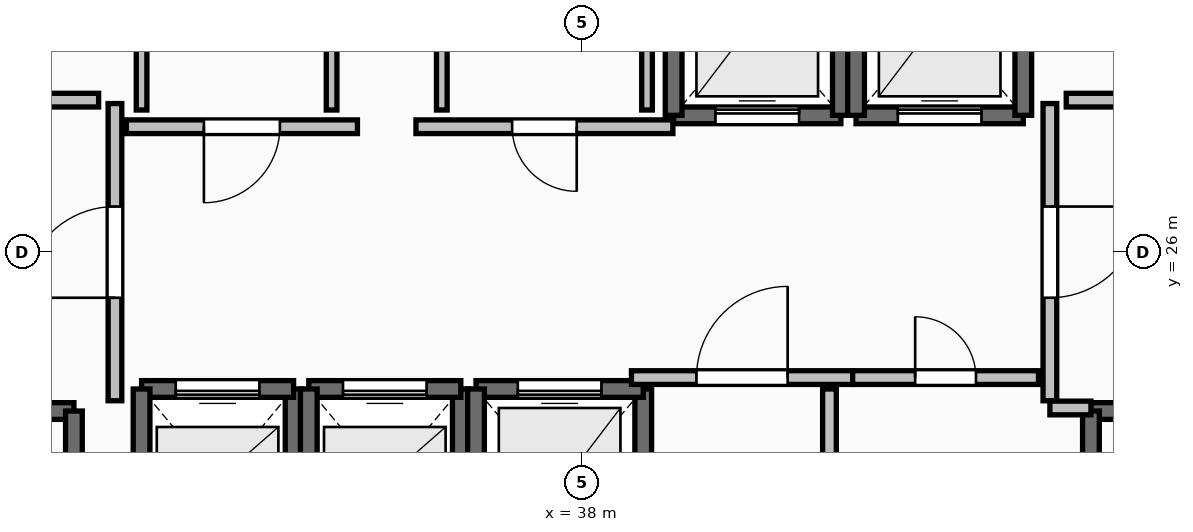
"""IFC4 building model, lengths in metres.
Left out: names, types, materials, properties, quantities, classifications, styles, units other than length and angle.
Written with IfcOpenShell. Run it as: python <this file> out.ifc"""

import sys

from ifc_helpers import new_model, si_unit, direction, frame, frame_2d, origin, place, context, subcontext, project, spatial, rectangle, extrude, element, fill, save


model = new_model("IFC4")
c1 = context("Model", 3, precision=1e-05, world=origin(), true_north=direction((0.0, 1.0)))
c2 = subcontext(c1, "Body", "Model", "MODEL_VIEW")
j1 = project(units=[si_unit("LENGTHUNIT", "METRE"), si_unit("PLANEANGLEUNIT", "RADIAN")], contexts=[c1])
p1 = place(None, origin())
s1 = spatial("IfcSite", under=j1, at=p1, CompositionType="ELEMENT")
p2 = place(p1, origin())
s2 = spatial("IfcBuilding", under=s1, at=p2, CompositionType="ELEMENT")
p3 = place(p2, frame((0.0, 0.0, 174.6)))
s3 = spatial("IfcBuildingStorey", under=s2, at=p3, CompositionType="ELEMENT", Elevation=174.6)
p4 = place(p3, frame((27.94, 23.91, 0.0), z_axis=(0.0, 0.0, 1.0), x_axis=(1.0, 0.0, 0.0)))
e1 = element("IfcWall", 1, at=p4, inside=s3, PredefinedType="SOLIDWALL", context=c2, shape_type="SweptSolid", body=[
    extrude(rectangle(XDim=3.37, YDim=0.22, at=frame_2d((1.685, 0.0))), origin(), (0.0, 0.0, 1.0), 4.24),
])
p5 = place(p4, frame((1.135, 0.0, 0.0)))
e2 = element("IfcOpeningElement", 2, at=p5, cuts=e1, PredefinedType="OPENING", context=c2, shape_type="SweptSolid", body=[
    extrude(rectangle(XDim=1.1, YDim=2.15, at=frame_2d((0.55, 1.075))), frame((0.0, 0.125, 0.0), z_axis=(0.0, -1.0, 0.0), x_axis=(1.0, 0.0, 0.0)), (0.0, 0.0, 1.0), 0.25),
])
p6 = place(p3, frame((31.31, 23.91, 0.0), z_axis=(0.0, 0.0, 1.0), x_axis=(0.0, -1.0, 0.0)))
e3 = element("IfcWall", 3, at=p6, inside=s3, PredefinedType="SOLIDWALL", context=c2, shape_type="SweptSolid", body=[
    extrude(rectangle(XDim=7.42, YDim=0.22, at=frame_2d((3.71, 0.0))), origin(), (0.0, 0.0, 1.0), 4.24),
])
p7 = place(p3, frame((44.69, 23.91, 0.0), z_axis=(0.0, 0.0, 1.0), x_axis=(1.0, 0.0, 0.0)))
e4 = element("IfcWall", 4, at=p7, inside=s3, PredefinedType="SOLIDWALL", context=c2, shape_type="SweptSolid", body=[
    extrude(rectangle(XDim=3.37, YDim=0.22, at=frame_2d((1.685, 0.0))), origin(), (0.0, 0.0, 1.0), 4.24),
])
p8 = place(p7, frame((1.135, 0.0, 0.0)))
e5 = element("IfcOpeningElement", 5, at=p8, cuts=e4, PredefinedType="OPENING", context=c2, shape_type="SweptSolid", body=[
    extrude(rectangle(XDim=1.1, YDim=2.15, at=frame_2d((0.55, 1.075))), frame((0.0, 0.125, 0.0), z_axis=(0.0, -1.0, 0.0), x_axis=(1.0, 0.0, 0.0)), (0.0, 0.0, 1.0), 0.25),
])
p9 = place(p3, frame((44.69, 16.49, 0.0), z_axis=(0.0, 0.0, 1.0), x_axis=(0.0, 1.0, 0.0)))
e6 = element("IfcWall", 6, at=p9, inside=s3, PredefinedType="SOLIDWALL", context=c2, shape_type="SweptSolid", body=[
    extrude(rectangle(XDim=7.42, YDim=0.22, at=frame_2d((3.71, 0.0))), origin(), (0.0, 0.0, 1.0), 4.24),
])
p10 = place(p3, frame((34.2, 21.8, 0.0), z_axis=(0.0, 0.0, 1.0), x_axis=(0.0, 1.0, 0.0)))
e7 = element("IfcWall", 7, at=p10, inside=s3, PredefinedType="SOLIDWALL", context=c2, shape_type="SweptSolid", body=[
    extrude(rectangle(XDim=2.4, YDim=0.22, at=frame_2d((1.2, 0.0))), origin(), (0.0, 0.0, 1.0), 4.24),
])
p11 = place(p3, frame((34.2, 24.2, 0.0), z_axis=(0.0, 0.0, 1.0), x_axis=(-1.0, 0.0, 0.0)))
e8 = element("IfcWall", 8, at=p11, inside=s3, PredefinedType="SOLIDWALL", context=c2, shape_type="SweptSolid", body=[
    extrude(rectangle(XDim=2.0, YDim=0.22, at=frame_2d((1.0, 0.0))), origin(), (0.0, 0.0, 1.0), 4.24),
])
p12 = place(p11, frame((0.45, 0.0, 0.0)))
e9 = element("IfcOpeningElement", 9, at=p12, cuts=e8, PredefinedType="OPENING", context=c2, shape_type="SweptSolid", body=[
    extrude(rectangle(XDim=1.1, YDim=2.2, at=frame_2d((0.55, 1.1))), frame((0.0, 0.125, 0.0), z_axis=(0.0, -1.0, 0.0), x_axis=(1.0, 0.0, 0.0)), (0.0, 0.0, 1.0), 0.25),
])
for number, where, z_axis, x_axis in (
    (10, (32.2, 24.2, 0.0), (0.0, 0.0, 1.0), (0.0, -1.0, 0.0)),
    (11, (36.4, 21.8, 0.0), (0.0, 0.0, 1.0), (0.0, 1.0, 0.0)),
):
    element("IfcWall", number, at=place(p3, frame(where, z_axis=z_axis, x_axis=x_axis)), inside=s3, PredefinedType="SOLIDWALL", context=c2, shape_type="SweptSolid", body=[
        extrude(rectangle(XDim=2.4, YDim=0.22, at=frame_2d((1.2, 0.0))), origin(), (0.0, 0.0, 1.0), 4.24),
    ])
p13 = place(p3, frame((36.4, 24.2, 0.0), z_axis=(0.0, 0.0, 1.0), x_axis=(-1.0, 0.0, 0.0)))
e12 = element("IfcWall", 12, at=p13, inside=s3, PredefinedType="SOLIDWALL", context=c2, shape_type="SweptSolid", body=[
    extrude(rectangle(XDim=2.0, YDim=0.22, at=frame_2d((1.0, 0.0))), origin(), (0.0, 0.0, 1.0), 4.24),
])
p14 = place(p13, frame((0.45, 0.0, 0.0)))
e13 = element("IfcOpeningElement", 13, at=p14, cuts=e12, PredefinedType="OPENING", context=c2, shape_type="SweptSolid", body=[
    extrude(rectangle(XDim=1.1, YDim=2.2, at=frame_2d((0.55, 1.1))), frame((0.0, 0.125, 0.0), z_axis=(0.0, -1.0, 0.0), x_axis=(1.0, 0.0, 0.0)), (0.0, 0.0, 1.0), 0.25),
])
p15 = place(p3, frame((34.4, 24.2, 0.0), z_axis=(0.0, 0.0, 1.0), x_axis=(0.0, -1.0, 0.0)))
e14 = element("IfcWall", 14, at=p15, inside=s3, PredefinedType="SOLIDWALL", context=c2, shape_type="SweptSolid", body=[
    extrude(rectangle(XDim=2.4, YDim=0.22, at=frame_2d((1.2, 0.0))), origin(), (0.0, 0.0, 1.0), 4.24),
])
p16 = place(p3, frame((38.8, 21.6, 0.0), z_axis=(0.0, 0.0, 1.0), x_axis=(0.0, 1.0, 0.0)))
e15 = element("IfcWall", 15, at=p16, inside=s3, PredefinedType="SOLIDWALL", context=c2, shape_type="SweptSolid", body=[
    extrude(rectangle(XDim=2.6, YDim=0.22, at=frame_2d((1.3, 0.0))), origin(), (0.0, 0.0, 1.0), 4.24),
])
p17 = place(p3, frame((38.8, 24.2, 0.0), z_axis=(0.0, 0.0, 1.0), x_axis=(-1.0, 0.0, 0.0)))
e16 = element("IfcWall", 16, at=p17, inside=s3, PredefinedType="SOLIDWALL", context=c2, shape_type="SweptSolid", body=[
    extrude(rectangle(XDim=2.2, YDim=0.22, at=frame_2d((1.1, 0.0))), origin(), (0.0, 0.0, 1.0), 4.24),
])
p18 = place(p17, frame((0.55, 0.0, 0.0)))
e17 = element("IfcOpeningElement", 17, at=p18, cuts=e16, PredefinedType="OPENING", context=c2, shape_type="SweptSolid", body=[
    extrude(rectangle(XDim=1.1, YDim=2.2, at=frame_2d((0.55, 1.1))), frame((0.0, 0.125, 0.0), z_axis=(0.0, -1.0, 0.0), x_axis=(1.0, 0.0, 0.0)), (0.0, 0.0, 1.0), 0.25),
])
p19 = place(p3, frame((36.6, 24.2, 0.0), z_axis=(0.0, 0.0, 1.0), x_axis=(0.0, -1.0, 0.0)))
e18 = element("IfcWall", 18, at=p19, inside=s3, PredefinedType="SOLIDWALL", context=c2, shape_type="SweptSolid", body=[
    extrude(rectangle(XDim=2.6, YDim=0.22, at=frame_2d((1.3, 0.0))), origin(), (0.0, 0.0, 1.0), 4.24),
])
p20 = place(p3, frame((39.2, 27.8, 0.0), z_axis=(0.0, 0.0, 1.0), x_axis=(1.0, 0.0, 0.0)))
e19 = element("IfcWall", 19, at=p20, inside=s3, PredefinedType="SOLIDWALL", context=c2, shape_type="SweptSolid", body=[
    extrude(rectangle(XDim=2.2, YDim=0.22, at=frame_2d((1.1, 0.0))), origin(), (0.0, 0.0, 1.0), 4.24),
])
p21 = place(p20, frame((0.55, 0.0, 0.0)))
e20 = element("IfcOpeningElement", 20, at=p21, cuts=e19, PredefinedType="OPENING", context=c2, shape_type="SweptSolid", body=[
    extrude(rectangle(XDim=1.1, YDim=2.2, at=frame_2d((0.55, 1.1))), frame((0.0, 0.125, 0.0), z_axis=(0.0, -1.0, 0.0), x_axis=(1.0, 0.0, 0.0)), (0.0, 0.0, 1.0), 0.25),
])
for number, where, z_axis, x_axis in (
    (21, (41.4, 27.8, 0.0), (0.0, 0.0, 1.0), (0.0, 1.0, 0.0)),
    (22, (39.2, 30.4, 0.0), (0.0, 0.0, 1.0), (0.0, -1.0, 0.0)),
):
    element("IfcWall", number, at=place(p3, frame(where, z_axis=z_axis, x_axis=x_axis)), inside=s3, PredefinedType="SOLIDWALL", context=c2, shape_type="SweptSolid", body=[
        extrude(rectangle(XDim=2.6, YDim=0.22, at=frame_2d((1.3, 0.0))), origin(), (0.0, 0.0, 1.0), 4.24),
    ])
p22 = place(p3, frame((41.6, 27.8, 0.0), z_axis=(0.0, 0.0, 1.0), x_axis=(1.0, 0.0, 0.0)))
e23 = element("IfcWall", 23, at=p22, inside=s3, PredefinedType="SOLIDWALL", context=c2, shape_type="SweptSolid", body=[
    extrude(rectangle(XDim=2.2, YDim=0.22, at=frame_2d((1.1, 0.0))), origin(), (0.0, 0.0, 1.0), 4.24),
])
p23 = place(p22, frame((0.55, 0.0, 0.0)))
e24 = element("IfcOpeningElement", 24, at=p23, cuts=e23, PredefinedType="OPENING", context=c2, shape_type="SweptSolid", body=[
    extrude(rectangle(XDim=1.1, YDim=2.2, at=frame_2d((0.55, 1.1))), frame((0.0, 0.125, 0.0), z_axis=(0.0, -1.0, 0.0), x_axis=(1.0, 0.0, 0.0)), (0.0, 0.0, 1.0), 0.25),
])
for number, where, z_axis, x_axis in (
    (25, (43.8, 27.8, 0.0), (0.0, 0.0, 1.0), (0.0, 1.0, 0.0)),
    (26, (41.6, 30.4, 0.0), (0.0, 0.0, 1.0), (0.0, -1.0, 0.0)),
):
    element("IfcWall", number, at=place(p3, frame(where, z_axis=z_axis, x_axis=x_axis)), inside=s3, PredefinedType="SOLIDWALL", context=c2, shape_type="SweptSolid", body=[
        extrude(rectangle(XDim=2.6, YDim=0.22, at=frame_2d((1.3, 0.0))), origin(), (0.0, 0.0, 1.0), 4.24),
    ])
p24 = place(p3, frame((31.85, 24.045, 0.0), z_axis=(0.0, 0.0, 1.0), x_axis=(0.0, 1.0, 0.0)))
e27 = element("IfcWall", 27, at=p24, inside=s3, PredefinedType="PARTITIONING", context=c2, shape_type="SweptSolid", body=[
    extrude(rectangle(XDim=3.91, YDim=0.18, at=frame_2d((1.955, 0.0))), origin(), (0.0, 0.0, 1.0), 4.24),
])
p25 = place(p24, frame((1.355, 0.0, 0.0)))
e28 = element("IfcOpeningElement", 28, at=p25, cuts=e27, PredefinedType="OPENING", context=c2, shape_type="SweptSolid", body=[
    extrude(rectangle(XDim=1.2, YDim=2.15, at=frame_2d((0.6, 1.075))), frame((0.0, 0.105, 0.0), z_axis=(0.0, -1.0, 0.0), x_axis=(1.0, 0.0, 0.0)), (0.0, 0.0, 1.0), 0.21),
])
p26 = place(p3, frame((44.15, 27.955, 0.0), z_axis=(0.0, 0.0, 1.0), x_axis=(0.0, -1.0, 0.0)))
e29 = element("IfcWall", 29, at=p26, inside=s3, PredefinedType="PARTITIONING", context=c2, shape_type="SweptSolid", body=[
    extrude(rectangle(XDim=3.91, YDim=0.18, at=frame_2d((1.955, 0.0))), origin(), (0.0, 0.0, 1.0), 4.24),
])
p27 = place(p26, frame((1.355, 0.0, 0.0)))
e30 = element("IfcOpeningElement", 30, at=p27, cuts=e29, PredefinedType="OPENING", context=c2, shape_type="SweptSolid", body=[
    extrude(rectangle(XDim=1.2, YDim=2.15, at=frame_2d((0.6, 1.075))), frame((0.0, 0.105, 0.0), z_axis=(0.0, -1.0, 0.0), x_axis=(1.0, 0.0, 0.0)), (0.0, 0.0, 1.0), 0.21),
])
p28 = place(p3, frame((44.15, 23.95, 0.0), z_axis=(0.0, 0.0, 1.0), x_axis=(1.0, 0.0, 0.0)))
e31 = element("IfcWall", 31, at=p28, inside=s3, PredefinedType="PARTITIONING", context=c2, shape_type="SweptSolid", body=[
    extrude(rectangle(XDim=0.54, YDim=0.18, at=frame_2d((0.27, 0.0))), origin(), (0.0, 0.0, 1.0), 4.24),
])
p29 = place(p3, frame((38.645, 24.35, 0.0), z_axis=(0.0, 0.0, 1.0), x_axis=(1.0, 0.0, 0.0)))
e32 = element("IfcWall", 32, at=p29, inside=s3, PredefinedType="PARTITIONING", context=c2, shape_type="SweptSolid", body=[
    extrude(rectangle(XDim=2.91, YDim=0.18, at=frame_2d((1.455, 0.0))), origin(), (0.0, 0.0, 1.0), 4.24),
])
p30 = place(p29, frame((0.855, 0.0, 0.0)))
e33 = element("IfcOpeningElement", 33, at=p30, cuts=e32, PredefinedType="OPENING", context=c2, shape_type="SweptSolid", body=[
    extrude(rectangle(XDim=1.2, YDim=2.15, at=frame_2d((0.6, 1.075))), frame((0.0, 0.105, 0.0), z_axis=(0.0, -1.0, 0.0), x_axis=(1.0, 0.0, 0.0)), (0.0, 0.0, 1.0), 0.21),
])
p31 = place(p3, frame((41.555, 24.35, 0.0), z_axis=(0.0, 0.0, 1.0), x_axis=(1.0, 0.0, 0.0)))
e34 = element("IfcWall", 34, at=p31, inside=s3, PredefinedType="PARTITIONING", context=c2, shape_type="SweptSolid", body=[
    extrude(rectangle(XDim=2.445, YDim=0.18, at=frame_2d((1.223, 0.0))), origin(), (0.0, 0.0, 1.0), 4.24),
])
p32 = place(p31, frame((0.823, 0.0, 0.0)))
e35 = element("IfcOpeningElement", 35, at=p32, cuts=e34, PredefinedType="OPENING", context=c2, shape_type="SweptSolid", body=[
    extrude(rectangle(XDim=0.8, YDim=2.05, at=frame_2d((0.4, 1.025))), frame((0.0, 0.105, 0.0), z_axis=(0.0, -1.0, 0.0), x_axis=(1.0, 0.0, 0.0)), (0.0, 0.0, 1.0), 0.21),
])
p33 = place(p3, frame((35.04, 27.65, 0.0), z_axis=(0.0, 0.0, 1.0), x_axis=(-1.0, 0.0, 0.0)))
e36 = element("IfcWall", 36, at=p33, inside=s3, PredefinedType="PARTITIONING", context=c2, shape_type="SweptSolid", body=[
    extrude(rectangle(XDim=3.04, YDim=0.18, at=frame_2d((1.52, 0.0))), origin(), (0.0, 0.0, 1.0), 4.24),
])
p34 = place(p33, frame((1.02, 0.0, 0.0)))
e37 = element("IfcOpeningElement", 37, at=p34, cuts=e36, PredefinedType="OPENING", context=c2, shape_type="SweptSolid", body=[
    extrude(rectangle(XDim=1.0, YDim=2.15, at=frame_2d((0.5, 1.075))), frame((0.0, 0.105, 0.0), z_axis=(0.0, -1.0, 0.0), x_axis=(1.0, 0.0, 0.0)), (0.0, 0.0, 1.0), 0.21),
])
p35 = place(p3, frame((39.19, 27.65, 0.0), z_axis=(0.0, 0.0, 1.0), x_axis=(-1.0, 0.0, 0.0)))
e38 = element("IfcWall", 38, at=p35, inside=s3, PredefinedType="PARTITIONING", context=c2, shape_type="SweptSolid", body=[
    extrude(rectangle(XDim=3.38, YDim=0.18, at=frame_2d((1.69, 0.0))), origin(), (0.0, 0.0, 1.0), 4.24),
])
p36 = place(p35, frame((1.265, 0.0, 0.0)))
e39 = element("IfcOpeningElement", 39, at=p36, cuts=e38, PredefinedType="OPENING", context=c2, shape_type="SweptSolid", body=[
    extrude(rectangle(XDim=0.85, YDim=2.1, at=frame_2d((0.425, 1.05))), frame((0.0, 0.105, 0.0), z_axis=(0.0, -1.0, 0.0), x_axis=(1.0, 0.0, 0.0)), (0.0, 0.0, 1.0), 0.21),
])
p37 = place(p3, frame((41.25, 16.32, 0.0), z_axis=(0.0, 0.0, 1.0), x_axis=(0.0, 1.0, 0.0)))
e40 = element("IfcWall", 40, at=p37, inside=s3, PredefinedType="PARTITIONING", context=c2, shape_type="SweptSolid", body=[
    extrude(rectangle(XDim=7.88, YDim=0.18, at=frame_2d((3.94, 0.0))), origin(), (0.0, 0.0, 1.0), 4.24),
])
p38 = place(p37, frame((3.54, 0.0, 0.0)))
e41 = element("IfcOpeningElement", 41, at=p38, cuts=e40, PredefinedType="OPENING", context=c2, shape_type="SweptSolid", body=[
    extrude(rectangle(XDim=0.8, YDim=2.05, at=frame_2d((0.4, 1.025))), frame((0.0, 0.105, 0.0), z_axis=(0.0, -1.0, 0.0), x_axis=(1.0, 0.0, 0.0)), (0.0, 0.0, 1.0), 0.21),
])
for number, where, z_axis, x_axis in (
    (42, (31.635, 28.0, 0.0), (0.0, 0.0, 1.0), (-1.0, 0.0, 0.0)),
    (43, (45.28, 28.0, 0.0), (0.0, 0.0, 1.0), (-1.0, 0.0, 0.0)),
):
    element("IfcWall", number, at=place(p3, frame(where, z_axis=z_axis, x_axis=x_axis)), inside=s3, PredefinedType="PARTITIONING", context=c2, shape_type="SweptSolid", body=[
        extrude(rectangle(XDim=0.915, YDim=0.18, at=frame_2d((0.458, 0.0))), origin(), (0.0, 0.0, 1.0), 4.24),
    ])
for number, where, z_axis, x_axis in (
    (44, (32.2, 30.26, 0.0), (0.0, 0.0, 1.0), (0.0, -1.0, 0.0)),
    (45, (34.7, 27.87, 0.0), (0.0, 0.0, 1.0), (0.0, 1.0, 0.0)),
):
    element("IfcWall", number, at=place(p3, frame(where, z_axis=z_axis, x_axis=x_axis)), inside=s3, PredefinedType="PARTITIONING", context=c2, shape_type="SweptSolid", body=[
        extrude(rectangle(XDim=2.39, YDim=0.14, at=frame_2d((1.195, 0.0))), origin(), (0.0, 0.0, 1.0), 4.24),
    ])
p39 = place(p3, frame((36.15, 30.03, 0.0), z_axis=(0.0, 0.0, 1.0), x_axis=(0.0, -1.0, 0.0)))
e46 = element("IfcWall", 46, at=p39, inside=s3, PredefinedType="PARTITIONING", context=c2, shape_type="SweptSolid", body=[
    extrude(rectangle(XDim=2.16, YDim=0.14, at=frame_2d((1.08, 0.0))), origin(), (0.0, 0.0, 1.0), 4.24),
])
p40 = place(p3, frame((38.85, 27.87, 0.0), z_axis=(0.0, 0.0, 1.0), x_axis=(0.0, 1.0, 0.0)))
e47 = element("IfcWall", 47, at=p40, inside=s3, PredefinedType="PARTITIONING", context=c2, shape_type="SweptSolid", body=[
    extrude(rectangle(XDim=2.39, YDim=0.14, at=frame_2d((1.195, 0.0))), origin(), (0.0, 0.0, 1.0), 4.24),
])
p41 = place(p12, origin())
e48 = element("IfcDoor", 48, at=p41, inside=s3, OperationType="SLIDING_TO_LEFT", PredefinedType="DOOR", context=c2, shape_type="SweptSolid", body=[
    extrude(rectangle(XDim=1.1, YDim=2.2, at=frame_2d((0.55, 1.1))), frame((0.0, 0.025, 0.0), z_axis=(0.0, -1.0, 0.0), x_axis=(1.0, 0.0, 0.0)), (0.0, 0.0, 1.0), 0.05),
])
fill(e9, e48)
p42 = place(p14, origin())
e49 = element("IfcDoor", 49, at=p42, inside=s3, OperationType="SLIDING_TO_LEFT", PredefinedType="DOOR", context=c2, shape_type="SweptSolid", body=[
    extrude(rectangle(XDim=1.1, YDim=2.2, at=frame_2d((0.55, 1.1))), frame((0.0, 0.025, 0.0), z_axis=(0.0, -1.0, 0.0), x_axis=(1.0, 0.0, 0.0)), (0.0, 0.0, 1.0), 0.05),
])
fill(e13, e49)
p43 = place(p18, origin())
e50 = element("IfcDoor", 50, at=p43, inside=s3, OperationType="SLIDING_TO_LEFT", PredefinedType="DOOR", context=c2, shape_type="SweptSolid", body=[
    extrude(rectangle(XDim=1.1, YDim=2.2, at=frame_2d((0.55, 1.1))), frame((0.0, 0.025, 0.0), z_axis=(0.0, -1.0, 0.0), x_axis=(1.0, 0.0, 0.0)), (0.0, 0.0, 1.0), 0.05),
])
fill(e17, e50)
p44 = place(p21, origin())
e51 = element("IfcDoor", 51, at=p44, inside=s3, OperationType="SLIDING_TO_LEFT", PredefinedType="DOOR", context=c2, shape_type="SweptSolid", body=[
    extrude(rectangle(XDim=1.1, YDim=2.2, at=frame_2d((0.55, 1.1))), frame((0.0, 0.025, 0.0), z_axis=(0.0, -1.0, 0.0), x_axis=(1.0, 0.0, 0.0)), (0.0, 0.0, 1.0), 0.05),
])
fill(e20, e51)
p45 = place(p23, origin())
e52 = element("IfcDoor", 52, at=p45, inside=s3, OperationType="SLIDING_TO_LEFT", PredefinedType="DOOR", context=c2, shape_type="SweptSolid", body=[
    extrude(rectangle(XDim=1.1, YDim=2.2, at=frame_2d((0.55, 1.1))), frame((0.0, 0.025, 0.0), z_axis=(0.0, -1.0, 0.0), x_axis=(1.0, 0.0, 0.0)), (0.0, 0.0, 1.0), 0.05),
])
fill(e24, e52)
p46 = place(p25, origin())
e53 = element("IfcDoor", 53, at=p46, inside=s3, OperationType="SINGLE_SWING_LEFT", PredefinedType="DOOR", context=c2, shape_type="SweptSolid", body=[
    extrude(rectangle(XDim=1.2, YDim=2.15, at=frame_2d((0.6, 1.075))), frame((0.0, 0.025, 0.0), z_axis=(0.0, -1.0, 0.0), x_axis=(1.0, 0.0, 0.0)), (0.0, 0.0, 1.0), 0.05),
])
fill(e28, e53)
p47 = place(p27, origin())
e54 = element("IfcDoor", 54, at=p47, inside=s3, OperationType="SINGLE_SWING_LEFT", PredefinedType="DOOR", context=c2, shape_type="SweptSolid", body=[
    extrude(rectangle(XDim=1.2, YDim=2.15, at=frame_2d((0.6, 1.075))), frame((0.0, 0.025, 0.0), z_axis=(0.0, -1.0, 0.0), x_axis=(1.0, 0.0, 0.0)), (0.0, 0.0, 1.0), 0.05),
])
fill(e30, e54)
p48 = place(p30, origin())
e55 = element("IfcDoor", 55, at=p48, inside=s3, OperationType="SINGLE_SWING_RIGHT", PredefinedType="DOOR", context=c2, shape_type="SweptSolid", body=[
    extrude(rectangle(XDim=1.2, YDim=2.15, at=frame_2d((0.6, 1.075))), frame((0.0, 0.025, 0.0), z_axis=(0.0, -1.0, 0.0), x_axis=(1.0, 0.0, 0.0)), (0.0, 0.0, 1.0), 0.05),
])
fill(e33, e55)
p49 = place(p32, origin())
e56 = element("IfcDoor", 56, at=p49, inside=s3, OperationType="SINGLE_SWING_LEFT", PredefinedType="DOOR", context=c2, shape_type="SweptSolid", body=[
    extrude(rectangle(XDim=0.8, YDim=2.05, at=frame_2d((0.4, 1.025))), frame((0.0, 0.025, 0.0), z_axis=(0.0, -1.0, 0.0), x_axis=(1.0, 0.0, 0.0)), (0.0, 0.0, 1.0), 0.05),
])
fill(e35, e56)
p50 = place(p34, origin())
e57 = element("IfcDoor", 57, at=p50, inside=s3, OperationType="SINGLE_SWING_RIGHT", PredefinedType="DOOR", context=c2, shape_type="SweptSolid", body=[
    extrude(rectangle(XDim=1.0, YDim=2.15, at=frame_2d((0.5, 1.075))), frame((0.0, 0.025, 0.0), z_axis=(0.0, -1.0, 0.0), x_axis=(1.0, 0.0, 0.0)), (0.0, 0.0, 1.0), 0.05),
])
fill(e37, e57)
p51 = place(p36, origin())
e58 = element("IfcDoor", 58, at=p51, inside=s3, OperationType="SINGLE_SWING_LEFT", PredefinedType="DOOR", context=c2, shape_type="SweptSolid", body=[
    extrude(rectangle(XDim=0.85, YDim=2.1, at=frame_2d((0.425, 1.05))), frame((0.0, 0.025, 0.0), z_axis=(0.0, -1.0, 0.0), x_axis=(1.0, 0.0, 0.0)), (0.0, 0.0, 1.0), 0.05),
])
fill(e39, e58)
save(model, sys.argv[1])
